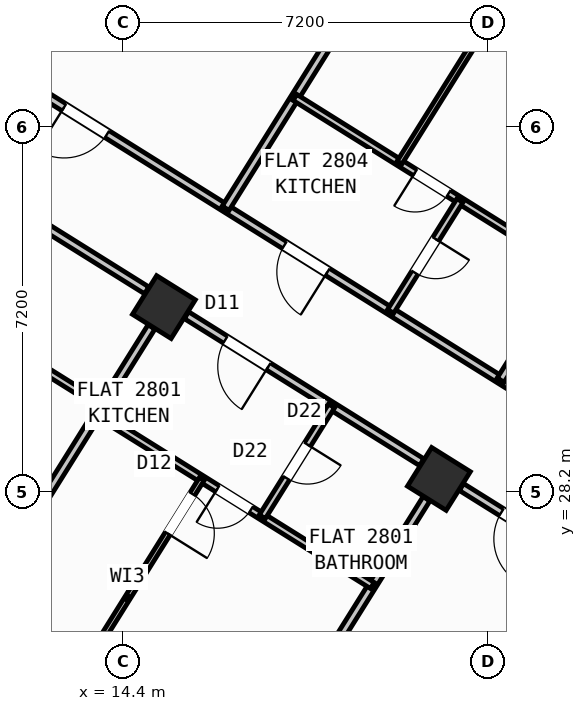
"""IFC4 building model, lengths in metres.
Left out: names, types, materials, properties, quantities, classifications, styles, units other than length and angle.
Written with IfcOpenShell. Run it as: python <this file> out.ifc"""

import sys

from ifc_helpers import new_model, si_unit, direction, frame, frame_2d, origin, origin_2d, place, context, subcontext, project, spatial, rectangle, hollow_rectangle, extrude, source, transform, mapped, element, fill, save


model = new_model("IFC4")
c1 = context("Model", 3, precision=1e-05, world=origin(), true_north=direction((0.0, 1.0)))
c2 = subcontext(c1, "Body", "Model", "MODEL_VIEW")
j1 = project(units=[si_unit("LENGTHUNIT", "METRE"), si_unit("PLANEANGLEUNIT", "RADIAN")], contexts=[c1])
p1 = place(None, origin())
s1 = spatial("IfcSite", under=j1, at=p1, CompositionType="ELEMENT")
p2 = place(p1, origin())
s2 = spatial("IfcBuilding", under=s1, at=p2, CompositionType="ELEMENT")
p3 = place(p2, frame((0.0, 0.0, 112.5)))
s3 = spatial("IfcBuildingStorey", under=s2, at=p3, CompositionType="ELEMENT", Elevation=112.5)
m1 = source(origin(), c2, "Body", "SweptSolid", [
    extrude(hollow_rectangle(XDim=0.9, YDim=0.9, WallThickness=0.036, at=origin_2d()), origin(), (0.0, 0.0, 1.0), 3.6),
])
for number, where, z_axis, x_axis in (
    (1, (20.632, 28.452, 0.0), (0.0, 0.0, 1.0), (-0.848, 0.53, 0.0)),
    (2, (15.205, 31.844, 0.0), (0.0, 0.0, 1.0), (-0.848, 0.53, 0.0)),
):
    element("IfcColumn", number, at=place(p3, frame(where, z_axis=z_axis, x_axis=x_axis)), inside=s3, PredefinedType="COLUMN", context=c2, shape_type="MappedRepresentation", body=[
        mapped(m1, transform((0.0, 0.0, 0.0), scale=1.0)),
    ])
p4 = place(p3, frame((31.76, 12.183, 0.0), z_axis=(0.0, 0.0, 1.0), x_axis=(-0.848047074256, 0.529920899612, 0.0)))
e3 = element("IfcWall", 3, at=p4, inside=s3, PredefinedType="STANDARD", context=c2, shape_type="SweptSolid", body=[
    extrude(rectangle(XDim=30.652, YDim=0.32, at=frame_2d((15.326, 0.0))), origin(), (0.0, 0.0, 1.0), 3.35),
])
p5 = place(p4, frame((15.153, 0.0, 0.0)))
e4 = element("IfcOpeningElement", 4, at=p5, cuts=e3, PredefinedType="OPENING", context=c2, shape_type="SweptSolid", body=[
    extrude(rectangle(XDim=1.2, YDim=2.15, at=frame_2d((0.6, 1.075))), frame((0.0, 0.17, 0.0), z_axis=(0.0, -1.0, 0.0), x_axis=(1.0, 0.0, 0.0)), (0.0, 0.0, 1.0), 0.34),
])
p6 = place(p4, frame((2.002, 0.0, 0.8)))
e5 = element("IfcOpeningElement", 5, at=p6, cuts=e3, PredefinedType="OPENING", context=c2, shape_type="SweptSolid", body=[
    extrude(rectangle(XDim=2.1, YDim=1.55, at=frame_2d((1.05, 0.775))), frame((0.0, 0.17, 0.0), z_axis=(0.0, -1.0, 0.0), x_axis=(1.0, 0.0, 0.0)), (0.0, 0.0, 1.0), 0.34),
])
p7 = place(p4, frame((7.206, 0.0, 0.8)))
e6 = element("IfcOpeningElement", 6, at=p7, cuts=e3, PredefinedType="OPENING", context=c2, shape_type="SweptSolid", body=[
    extrude(rectangle(XDim=2.1, YDim=1.55, at=frame_2d((1.05, 0.775))), frame((0.0, 0.17, 0.0), z_axis=(0.0, -1.0, 0.0), x_axis=(1.0, 0.0, 0.0)), (0.0, 0.0, 1.0), 0.34),
])
p8 = place(p4, frame((12.648, 0.0, 1.0)))
e7 = element("IfcOpeningElement", 7, at=p8, cuts=e3, PredefinedType="OPENING", context=c2, shape_type="SweptSolid", body=[
    extrude(rectangle(XDim=0.9, YDim=1.25, at=frame_2d((0.45, 0.625))), frame((0.0, 0.17, 0.0), z_axis=(0.0, -1.0, 0.0), x_axis=(1.0, 0.0, 0.0)), (0.0, 0.0, 1.0), 0.34),
])
p9 = place(p4, frame((19.59, 0.0, 0.95)))
e8 = element("IfcOpeningElement", 8, at=p9, cuts=e3, PredefinedType="OPENING", context=c2, shape_type="SweptSolid", body=[
    extrude(rectangle(XDim=1.2, YDim=1.4, at=frame_2d((0.6, 0.7))), frame((0.0, 0.17, 0.0), z_axis=(0.0, -1.0, 0.0), x_axis=(1.0, 0.0, 0.0)), (0.0, 0.0, 1.0), 0.34),
])
p10 = place(p4, frame((25.966, 0.0, 1.0)))
e9 = element("IfcOpeningElement", 9, at=p10, cuts=e3, PredefinedType="OPENING", context=c2, shape_type="SweptSolid", body=[
    extrude(rectangle(XDim=0.9, YDim=1.25, at=frame_2d((0.45, 0.625))), frame((0.0, 0.17, 0.0), z_axis=(0.0, -1.0, 0.0), x_axis=(1.0, 0.0, 0.0)), (0.0, 0.0, 1.0), 0.34),
])
p11 = place(p4, frame((28.871, 0.0, 1.0)))
e10 = element("IfcOpeningElement", 10, at=p11, cuts=e3, PredefinedType="OPENING", context=c2, shape_type="SweptSolid", body=[
    extrude(rectangle(XDim=0.9, YDim=1.25, at=frame_2d((0.45, 0.625))), frame((0.0, 0.17, 0.0), z_axis=(0.0, -1.0, 0.0), x_axis=(1.0, 0.0, 0.0)), (0.0, 0.0, 1.0), 0.34),
])
p12 = place(p3, frame((5.7, 28.71, 0.0), z_axis=(0.0, 0.0, 1.0), x_axis=(0.529923711467, 0.8480453172, 0.0)))
e11 = element("IfcWall", 11, at=p12, inside=s3, PredefinedType="STANDARD", context=c2, shape_type="SweptSolid", body=[
    extrude(rectangle(XDim=21.587, YDim=0.32, at=frame_2d((10.794, 0.0))), origin(), (0.0, 0.0, 1.0), 2.775),
])
p13 = place(p12, frame((1.984, 0.0, 0.8)))
e12 = element("IfcOpeningElement", 12, at=p13, cuts=e11, PredefinedType="OPENING", context=c2, shape_type="SweptSolid", body=[
    extrude(rectangle(XDim=2.1, YDim=1.55, at=frame_2d((1.05, 0.775))), frame((0.0, 0.17, 0.0), z_axis=(0.0, -1.0, 0.0), x_axis=(1.0, 0.0, 0.0)), (0.0, 0.0, 1.0), 0.34),
])
p14 = place(p12, frame((11.459, 0.0, 0.85)))
e13 = element("IfcOpeningElement", 13, at=p14, cuts=e11, PredefinedType="OPENING", context=c2, shape_type="SweptSolid", body=[
    extrude(rectangle(XDim=1.8, YDim=1.5, at=frame_2d((0.9, 0.75))), frame((0.0, 0.17, 0.0), z_axis=(0.0, -1.0, 0.0), x_axis=(1.0, 0.0, 0.0)), (0.0, 0.0, 1.0), 0.34),
])
p15 = place(p12, frame((18.335, 0.0, 0.85)))
e14 = element("IfcOpeningElement", 14, at=p15, cuts=e11, PredefinedType="OPENING", context=c2, shape_type="SweptSolid", body=[
    extrude(rectangle(XDim=1.5, YDim=1.5, at=frame_2d((0.75, 0.75))), frame((0.0, 0.17, 0.0), z_axis=(0.0, -1.0, 0.0), x_axis=(1.0, 0.0, 0.0)), (0.0, 0.0, 1.0), 0.34),
])
p16 = place(p3, frame((17.424, 47.083, 0.0), z_axis=(0.0, 0.0, 1.0), x_axis=(0.848049927979, -0.529916332693, 0.0)))
e15 = element("IfcWall", 15, at=p16, inside=s3, PredefinedType="STANDARD", context=c2, shape_type="SweptSolid", body=[
    extrude(rectangle(XDim=29.223, YDim=0.32, at=frame_2d((14.612, 0.0))), origin(), (0.0, 0.0, 1.0), 3.35),
])
p17 = place(p16, frame((3.77, 0.0, 0.0)))
e16 = element("IfcOpeningElement", 16, at=p17, cuts=e15, PredefinedType="OPENING", context=c2, shape_type="SweptSolid", body=[
    extrude(rectangle(XDim=1.05, YDim=2.15, at=frame_2d((0.525, 1.075))), frame((0.0, 0.17, 0.0), z_axis=(0.0, -1.0, 0.0), x_axis=(1.0, 0.0, 0.0)), (0.0, 0.0, 1.0), 0.34),
])
p18 = place(p16, frame((0.9, 0.0, 0.8)))
e17 = element("IfcOpeningElement", 17, at=p18, cuts=e15, PredefinedType="OPENING", context=c2, shape_type="SweptSolid", body=[
    extrude(rectangle(XDim=2.1, YDim=1.55, at=frame_2d((1.05, 0.775))), frame((0.0, 0.17, 0.0), z_axis=(0.0, -1.0, 0.0), x_axis=(1.0, 0.0, 0.0)), (0.0, 0.0, 1.0), 0.34),
])
p19 = place(p16, frame((6.972, 0.0, 1.0)))
e18 = element("IfcOpeningElement", 18, at=p19, cuts=e15, PredefinedType="OPENING", context=c2, shape_type="SweptSolid", body=[
    extrude(rectangle(XDim=0.9, YDim=1.25, at=frame_2d((0.45, 0.625))), frame((0.0, 0.17, 0.0), z_axis=(0.0, -1.0, 0.0), x_axis=(1.0, 0.0, 0.0)), (0.0, 0.0, 1.0), 0.34),
])
p20 = place(p16, frame((9.847, 0.0, 0.85)))
e19 = element("IfcOpeningElement", 19, at=p20, cuts=e15, PredefinedType="OPENING", context=c2, shape_type="SweptSolid", body=[
    extrude(rectangle(XDim=1.5, YDim=1.5, at=frame_2d((0.75, 0.75))), frame((0.0, 0.17, 0.0), z_axis=(0.0, -1.0, 0.0), x_axis=(1.0, 0.0, 0.0)), (0.0, 0.0, 1.0), 0.34),
])
p21 = place(p16, frame((13.889, 0.0, 0.95)))
e20 = element("IfcOpeningElement", 20, at=p21, cuts=e15, PredefinedType="OPENING", context=c2, shape_type="SweptSolid", body=[
    extrude(rectangle(XDim=1.2, YDim=1.4, at=frame_2d((0.6, 0.7))), frame((0.0, 0.17, 0.0), z_axis=(0.0, -1.0, 0.0), x_axis=(1.0, 0.0, 0.0)), (0.0, 0.0, 1.0), 0.34),
])
p22 = place(p16, frame((17.254, 0.0, 1.0)))
e21 = element("IfcOpeningElement", 21, at=p22, cuts=e15, PredefinedType="OPENING", context=c2, shape_type="SweptSolid", body=[
    extrude(rectangle(XDim=0.9, YDim=1.25, at=frame_2d((0.45, 0.625))), frame((0.0, 0.17, 0.0), z_axis=(0.0, -1.0, 0.0), x_axis=(1.0, 0.0, 0.0)), (0.0, 0.0, 1.0), 0.34),
])
p23 = place(p16, frame((20.764, 0.0, 0.8)))
e22 = element("IfcOpeningElement", 22, at=p23, cuts=e15, PredefinedType="OPENING", context=c2, shape_type="SweptSolid", body=[
    extrude(rectangle(XDim=2.1, YDim=1.55, at=frame_2d((1.05, 0.775))), frame((0.0, 0.17, 0.0), z_axis=(0.0, -1.0, 0.0), x_axis=(1.0, 0.0, 0.0)), (0.0, 0.0, 1.0), 0.34),
])
p24 = place(p16, frame((25.403, 0.0, 0.8)))
e23 = element("IfcOpeningElement", 23, at=p24, cuts=e15, PredefinedType="OPENING", context=c2, shape_type="SweptSolid", body=[
    extrude(rectangle(XDim=2.1, YDim=1.55, at=frame_2d((1.05, 0.775))), frame((0.0, 0.17, 0.0), z_axis=(0.0, -1.0, 0.0), x_axis=(1.0, 0.0, 0.0)), (0.0, 0.0, 1.0), 0.34),
])
p25 = place(p3, frame((23.899, 26.529, 0.0), z_axis=(0.0, 0.0, 1.0), x_axis=(-0.529920662441, -0.848047222457, 0.0)))
e24 = element("IfcWall", 24, at=p25, inside=s3, PredefinedType="PARTITIONING", context=c2, shape_type="SweptSolid", body=[
    extrude(rectangle(XDim=7.85, YDim=0.16, at=frame_2d((3.925, 0.0))), origin(), (0.0, 0.0, 1.0), 3.34),
])
p26 = place(p3, frame((25.065, 28.394, 0.0), z_axis=(0.0, 0.0, 1.0), x_axis=(-0.848048310262, 0.529918921593, 0.0)))
e25 = element("IfcWall", 25, at=p26, inside=s3, PredefinedType="PARTITIONING", context=c2, shape_type="SweptSolid", body=[
    extrude(rectangle(XDim=16.73, YDim=0.16, at=frame_2d((8.365, 0.0))), origin(), (0.0, 0.0, 1.0), 3.34),
])
p27 = place(p26, frame((2.22, 0.0, 0.0)))
e26 = element("IfcOpeningElement", 26, at=p27, cuts=e25, PredefinedType="OPENING", context=c2, shape_type="SweptSolid", body=[
    extrude(rectangle(XDim=0.86, YDim=2.05, at=frame_2d((0.43, 1.025))), frame((0.0, 0.09, 0.0), z_axis=(0.0, -1.0, 0.0), x_axis=(1.0, 0.0, 0.0)), (0.0, 0.0, 1.0), 0.18),
])
p28 = place(p26, frame((7.82, 0.0, 0.0)))
e27 = element("IfcOpeningElement", 27, at=p28, cuts=e25, PredefinedType="OPENING", context=c2, shape_type="SweptSolid", body=[
    extrude(rectangle(XDim=1.0, YDim=2.1, at=frame_2d((0.5, 1.05))), frame((0.0, 0.09, 0.0), z_axis=(0.0, -1.0, 0.0), x_axis=(1.0, 0.0, 0.0)), (0.0, 0.0, 1.0), 0.18),
])
p29 = place(p26, frame((12.95, 0.0, 0.0)))
e28 = element("IfcOpeningElement", 28, at=p29, cuts=e25, PredefinedType="OPENING", context=c2, shape_type="SweptSolid", body=[
    extrude(rectangle(XDim=1.0, YDim=2.1, at=frame_2d((0.5, 1.05))), frame((0.0, 0.09, 0.0), z_axis=(0.0, -1.0, 0.0), x_axis=(1.0, 0.0, 0.0)), (0.0, 0.0, 1.0), 0.18),
])
p30 = place(p3, frame((23.899, 26.529, 0.0), z_axis=(0.0, 0.0, 1.0), x_axis=(-0.848064240775, 0.529893426567, 0.0)))
e29 = element("IfcWall", 29, at=p30, inside=s3, PredefinedType="PARTITIONING", context=c2, shape_type="SweptSolid", body=[
    extrude(rectangle(XDim=3.328, YDim=0.16, at=frame_2d((1.664, 0.0))), origin(), (0.0, 0.0, 1.0), 2.775),
])
p31 = place(p30, frame((1.395, 0.0, 0.0)))
e30 = element("IfcOpeningElement", 30, at=p31, cuts=e29, PredefinedType="OPENING", context=c2, shape_type="SweptSolid", body=[
    extrude(rectangle(XDim=1.0, YDim=2.1, at=frame_2d((0.5, 1.05))), frame((0.0, 0.09, 0.0), z_axis=(0.0, -1.0, 0.0), x_axis=(1.0, 0.0, 0.0)), (0.0, 0.0, 1.0), 0.18),
])
p32 = place(p3, frame((20.293, 28.782, 0.0), z_axis=(0.0, 0.0, 1.0), x_axis=(-0.848040881926, 0.529930809241, 0.0)))
e31 = element("IfcWall", 31, at=p32, inside=s3, PredefinedType="PARTITIONING", context=c2, shape_type="SweptSolid", body=[
    extrude(rectangle(XDim=5.476, YDim=0.16, at=frame_2d((2.738, 0.0))), origin(), (0.0, 0.0, 1.0), 2.775),
])
p33 = place(p32, frame((3.568, 0.0, 0.0)))
e32 = element("IfcOpeningElement", 32, at=p33, cuts=e31, PredefinedType="OPENING", context=c2, shape_type="SweptSolid", body=[
    extrude(rectangle(XDim=1.0, YDim=2.1, at=frame_2d((0.5, 1.05))), frame((0.0, 0.09, 0.0), z_axis=(0.0, -1.0, 0.0), x_axis=(1.0, 0.0, 0.0)), (0.0, 0.0, 1.0), 0.18),
])
p34 = place(p3, frame((14.866, 32.173, 0.0), z_axis=(0.0, 0.0, 1.0), x_axis=(-0.848053401719, 0.529910773464, 0.0)))
e33 = element("IfcWall", 33, at=p34, inside=s3, PredefinedType="PARTITIONING", context=c2, shape_type="SweptSolid", body=[
    extrude(rectangle(XDim=5.476, YDim=0.16, at=frame_2d((2.738, 0.0))), origin(), (0.0, 0.0, 1.0), 2.775),
])
p35 = place(p34, frame((4.108, 0.0, 0.0)))
e34 = element("IfcOpeningElement", 34, at=p35, cuts=e33, PredefinedType="OPENING", context=c2, shape_type="SweptSolid", body=[
    extrude(rectangle(XDim=1.0, YDim=2.1, at=frame_2d((0.5, 1.05))), frame((0.0, 0.09, 0.0), z_axis=(0.0, -1.0, 0.0), x_axis=(1.0, 0.0, 0.0)), (0.0, 0.0, 1.0), 0.18),
])
for number, where, z_axis, x_axis in (
    (35, (20.387, 28.06, 0.0), (0.0, 0.0, 1.0), (-0.53, -0.848, 0.0)),
    (36, (14.96, 31.452, 0.0), (0.0, 0.0, 1.0), (-0.53, -0.848, 0.0)),
):
    element("IfcWall", number, at=place(p3, frame(where, z_axis=z_axis, x_axis=x_axis)), inside=s3, PredefinedType="PARTITIONING", context=c2, shape_type="SweptSolid", body=[
        extrude(rectangle(XDim=6.376, YDim=0.16, at=frame_2d((3.188, 0.0))), origin(), (0.0, 0.0, 1.0), 2.775),
    ])
p36 = place(p3, frame((19.318, 26.349, 0.0), z_axis=(0.0, 0.0, 1.0), x_axis=(-0.848039019877, 0.529933789039, 0.0)))
e37 = element("IfcWall", 37, at=p36, inside=s3, PredefinedType="PLUMBINGWALL", context=c2, shape_type="SweptSolid", body=[
    extrude(rectangle(XDim=6.4, YDim=0.14, at=frame_2d((3.2, 0.0))), origin(), (0.0, 0.0, 1.0), 3.34),
])
p37 = place(p36, frame((2.824, 0.0, 0.0)))
e38 = element("IfcOpeningElement", 38, at=p37, cuts=e37, PredefinedType="OPENING", context=c2, shape_type="SweptSolid", body=[
    extrude(rectangle(XDim=0.78, YDim=2.05, at=frame_2d((0.39, 1.025))), frame((0.0, 0.08, 0.0), z_axis=(0.0, -1.0, 0.0), x_axis=(1.0, 0.0, 0.0)), (0.0, 0.0, 1.0), 0.16),
])
p38 = place(p3, frame((18.514, 29.894, 0.0), z_axis=(0.0, 0.0, 1.0), x_axis=(-0.529913878929, -0.848051461244, 0.0)))
e39 = element("IfcWall", 39, at=p38, inside=s3, PredefinedType="PLUMBINGWALL", context=c2, shape_type="SweptSolid", body=[
    extrude(rectangle(XDim=2.58, YDim=0.14, at=frame_2d((1.29, 0.0))), origin(), (0.0, 0.0, 1.0), 3.34),
])
p39 = place(p38, frame((0.9, 0.0, 0.0)))
e40 = element("IfcOpeningElement", 40, at=p39, cuts=e39, PredefinedType="OPENING", context=c2, shape_type="SweptSolid", body=[
    extrude(rectangle(XDim=0.78, YDim=2.05, at=frame_2d((0.39, 1.025))), frame((0.0, 0.08, 0.0), z_axis=(0.0, -1.0, 0.0), x_axis=(1.0, 0.0, 0.0)), (0.0, 0.0, 1.0), 0.16),
])
p40 = place(p3, frame((15.953, 28.452, 0.0), z_axis=(0.0, 0.0, 1.0), x_axis=(-0.529919714018, -0.848047815099, 0.0)))
e41 = element("IfcWall", 41, at=p40, inside=s3, PredefinedType="PARTITIONING", context=c2, shape_type="SweptSolid", body=[
    extrude(rectangle(XDim=5.54, YDim=0.11, at=frame_2d((2.77, 0.0))), origin(), (0.0, 0.0, 1.0), 3.34),
])
p41 = place(p40, frame((0.35, 0.0, 0.0)))
e42 = element("IfcOpeningElement", 42, at=p41, cuts=e41, PredefinedType="OPENING", context=c2, shape_type="SweptSolid", body=[
    extrude(rectangle(XDim=0.92, YDim=2.08, at=frame_2d((0.46, 1.04))), frame((0.0, 0.065, 0.0), z_axis=(0.0, -1.0, 0.0), x_axis=(1.0, 0.0, 0.0)), (0.0, 0.0, 1.0), 0.13),
])
p42 = place(p3, frame((13.986, 29.893, 0.0), z_axis=(0.0, 0.0, 1.0), x_axis=(-0.848051346257, 0.52991406295, 0.0)))
e43 = element("IfcWall", 43, at=p42, inside=s3, PredefinedType="PLUMBINGWALL", context=c2, shape_type="SweptSolid", body=[
    extrude(rectangle(XDim=3.62, YDim=0.14, at=frame_2d((1.81, 0.0))), origin(), (0.0, 0.0, 1.0), 3.34),
])
for number, where, z_axis, x_axis in (
    (44, (24.256, 34.251, 0.0), (0.0, 0.0, 1.0), (-0.53, -0.848, 0.0)),
    (45, (18.828, 37.643, 0.0), (0.0, 0.0, 1.0), (-0.53, -0.848, 0.0)),
):
    element("IfcWall", number, at=place(p3, frame(where, z_axis=z_axis, x_axis=x_axis)), inside=s3, PredefinedType="PARTITIONING", context=c2, shape_type="SweptSolid", body=[
        extrude(rectangle(XDim=4.538, YDim=0.16, at=frame_2d((2.269, 0.0))), origin(), (0.0, 0.0, 1.0), 2.775),
    ])
p43 = place(p3, frame((23.218, 32.591, 0.0), z_axis=(0.0, 0.0, 1.0), x_axis=(-0.848056163074, 0.529906354247, 0.0)))
e46 = element("IfcWall", 46, at=p43, inside=s3, PredefinedType="PLUMBINGWALL", context=c2, shape_type="SweptSolid", body=[
    extrude(rectangle(XDim=6.4, YDim=0.14, at=frame_2d((3.2, 0.0))), origin(), (0.0, 0.0, 1.0), 3.34),
])
p44 = place(p43, frame((2.824, 0.0, 0.0)))
e47 = element("IfcOpeningElement", 47, at=p44, cuts=e46, PredefinedType="OPENING", context=c2, shape_type="SweptSolid", body=[
    extrude(rectangle(XDim=0.78, YDim=2.05, at=frame_2d((0.39, 1.025))), frame((0.0, 0.08, 0.0), z_axis=(0.0, -1.0, 0.0), x_axis=(1.0, 0.0, 0.0)), (0.0, 0.0, 1.0), 0.16),
])
p45 = place(p3, frame((21.047, 33.947, 0.0), z_axis=(0.0, 0.0, 1.0), x_axis=(-0.529913878929, -0.848051461244, 0.0)))
e48 = element("IfcWall", 48, at=p45, inside=s3, PredefinedType="PLUMBINGWALL", context=c2, shape_type="SweptSolid", body=[
    extrude(rectangle(XDim=2.58, YDim=0.14, at=frame_2d((1.29, 0.0))), origin(), (0.0, 0.0, 1.0), 3.34),
])
p46 = place(p45, frame((0.9, 0.0, 0.0)))
e49 = element("IfcOpeningElement", 49, at=p46, cuts=e48, PredefinedType="OPENING", context=c2, shape_type="SweptSolid", body=[
    extrude(rectangle(XDim=0.78, YDim=2.05, at=frame_2d((0.39, 1.025))), frame((0.0, 0.08, 0.0), z_axis=(0.0, -1.0, 0.0), x_axis=(1.0, 0.0, 0.0)), (0.0, 0.0, 1.0), 0.16),
])
p47 = place(p3, frame((24.802, 42.614, 0.0), z_axis=(0.0, 0.0, 1.0), x_axis=(-0.529926099889, -0.848043824727, 0.0)))
e50 = element("IfcWall", 50, at=p47, inside=s3, PredefinedType="PARTITIONING", context=c2, shape_type="SweptSolid", body=[
    extrude(rectangle(XDim=9.34, YDim=0.11, at=frame_2d((4.67, 0.0))), origin(), (0.0, 0.0, 1.0), 3.34),
])
p48 = place(p47, frame((0.47, 0.0, 0.0)))
e51 = element("IfcOpeningElement", 51, at=p48, cuts=e50, PredefinedType="OPENING", context=c2, shape_type="SweptSolid", body=[
    extrude(rectangle(XDim=0.92, YDim=2.08, at=frame_2d((0.46, 1.04))), frame((0.0, 0.065, 0.0), z_axis=(0.0, -1.0, 0.0), x_axis=(1.0, 0.0, 0.0)), (0.0, 0.0, 1.0), 0.13),
])
m2 = source(origin(), c2, "Body", "SweptSolid", [
    extrude(rectangle(XDim=1.0, YDim=2.1, at=frame_2d((0.5, 1.05))), frame((0.0, 0.025, 0.0), z_axis=(0.0, -1.0, 0.0), x_axis=(1.0, 0.0, 0.0)), (0.0, 0.0, 1.0), 0.05),
])
p49 = place(p31, origin())
e52 = element("IfcDoor", 52, at=p49, inside=s3, OperationType="SINGLE_SWING_LEFT", PredefinedType="DOOR", context=c2, shape_type="MappedRepresentation", body=[
    mapped(m2, transform((0.0, 0.0, 0.0), scale=1.0)),
])
fill(e30, e52)
m3 = source(origin(), c2, "Body", "SweptSolid", [
    extrude(rectangle(XDim=0.92, YDim=2.08, at=frame_2d((0.46, 1.04))), frame((0.0, 0.025, 0.0), z_axis=(0.0, -1.0, 0.0), x_axis=(1.0, 0.0, 0.0)), (0.0, 0.0, 1.0), 0.05),
])
p50 = place(p41, origin())
e53 = element("IfcDoor", 53, at=p50, inside=s3, OperationType="SINGLE_SWING_RIGHT", PredefinedType="DOOR", context=c2, shape_type="MappedRepresentation", body=[
    mapped(m3, transform((0.0, 0.0, 0.0), scale=1.0)),
])
fill(e42, e53)
p51 = place(p33, origin())
e54 = element("IfcDoor", 54, at=p51, inside=s3, OperationType="SINGLE_SWING_LEFT", PredefinedType="DOOR", context=c2, shape_type="MappedRepresentation", body=[
    mapped(m2, transform((0.0, 0.0, 0.0), scale=1.0)),
])
fill(e32, e54)
m4 = source(origin(), c2, "Body", "SweptSolid", [
    extrude(rectangle(XDim=0.78, YDim=2.05, at=frame_2d((0.39, 1.025))), frame((0.0, 0.025, 0.0), z_axis=(0.0, -1.0, 0.0), x_axis=(1.0, 0.0, 0.0)), (0.0, 0.0, 1.0), 0.05),
])
p52 = place(p37, origin())
e55 = element("IfcDoor", 55, at=p52, inside=s3, OperationType="SINGLE_SWING_RIGHT", PredefinedType="DOOR", context=c2, shape_type="MappedRepresentation", body=[
    mapped(m4, transform((0.0, 0.0, 0.0), scale=1.0)),
])
fill(e38, e55)
p53 = place(p39, origin())
e56 = element("IfcDoor", 56, at=p53, inside=s3, OperationType="SINGLE_SWING_LEFT", PredefinedType="DOOR", context=c2, shape_type="MappedRepresentation", body=[
    mapped(m4, transform((0.0, 0.0, 0.0), scale=1.0)),
])
fill(e40, e56)
p54 = place(p28, origin())
e57 = element("IfcDoor", 57, at=p54, inside=s3, OperationType="SINGLE_SWING_LEFT", PredefinedType="DOOR", context=c2, shape_type="MappedRepresentation", body=[
    mapped(m2, transform((0.0, 0.0, 0.0), scale=1.0)),
])
fill(e27, e57)
p55 = place(p44, origin())
e58 = element("IfcDoor", 58, at=p55, inside=s3, OperationType="SINGLE_SWING_RIGHT", PredefinedType="DOOR", context=c2, shape_type="MappedRepresentation", body=[
    mapped(m4, transform((0.0, 0.0, 0.0), scale=1.0)),
])
fill(e47, e58)
p56 = place(p46, origin())
e59 = element("IfcDoor", 59, at=p56, inside=s3, OperationType="SINGLE_SWING_LEFT", PredefinedType="DOOR", context=c2, shape_type="MappedRepresentation", body=[
    mapped(m4, transform((0.0, 0.0, 0.0), scale=1.0)),
])
fill(e49, e59)
p57 = place(p29, origin())
e60 = element("IfcDoor", 60, at=p57, inside=s3, OperationType="SINGLE_SWING_RIGHT", PredefinedType="DOOR", context=c2, shape_type="MappedRepresentation", body=[
    mapped(m2, transform((0.0, 0.0, 0.0), scale=1.0)),
])
fill(e28, e60)
save(model, sys.argv[1])
